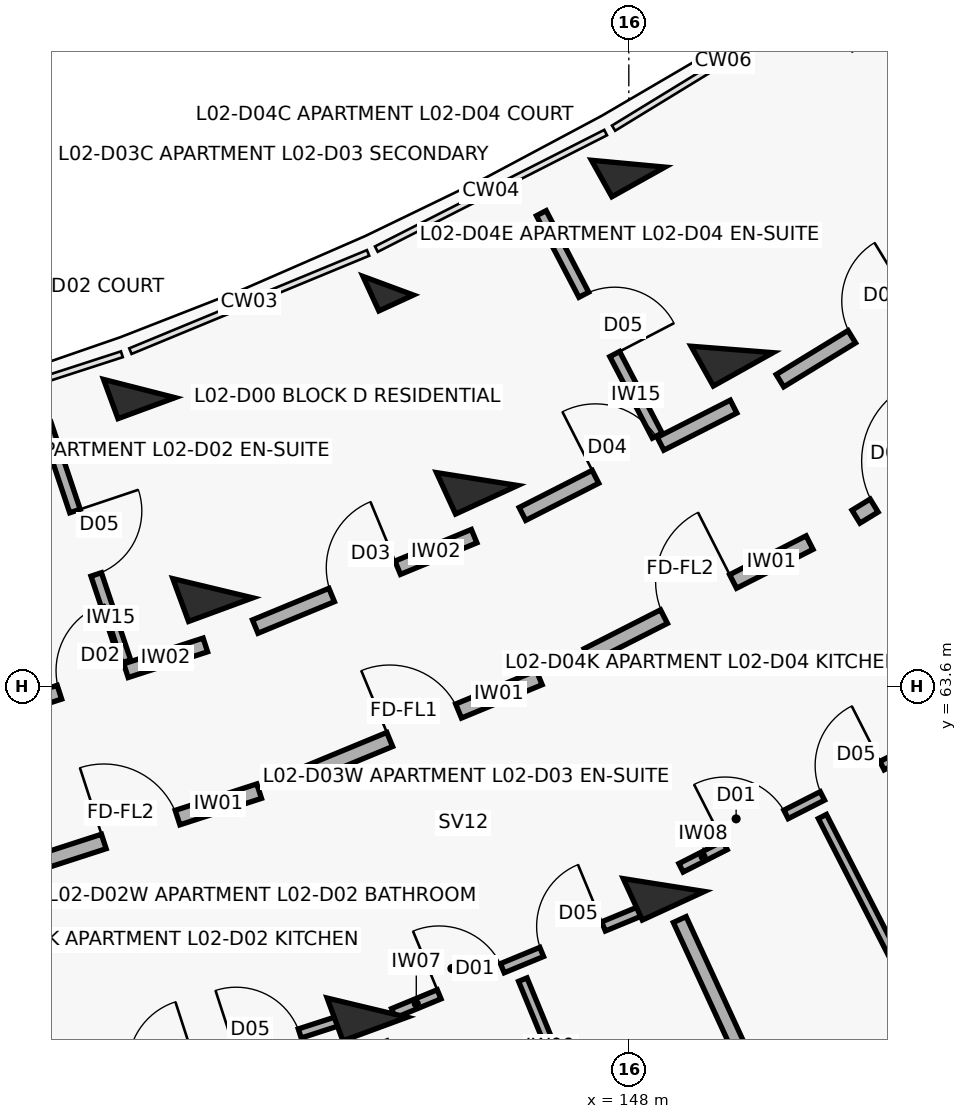
"""IFC4 building model, lengths in metres.
Left out: names, types, materials, properties, quantities, classifications, styles, units other than length and angle.
Written with IfcOpenShell. Run it as: python <this file> out.ifc"""

import sys

from ifc_helpers import new_model, si_unit, direction, frame, frame_2d, origin, origin_2d, place, context, subcontext, project, spatial, rectangle, extrude, element, fill, save


model = new_model("IFC4")
c1 = context("Model", 3, precision=1e-05, world=origin(), true_north=direction((0.0, 1.0)))
c2 = subcontext(c1, "Body", "Model", "MODEL_VIEW")
j1 = project(units=[si_unit("LENGTHUNIT", "METRE"), si_unit("PLANEANGLEUNIT", "RADIAN")], contexts=[c1])
p1 = place(None, origin())
s1 = spatial("IfcSite", under=j1, at=p1, CompositionType="ELEMENT")
p2 = place(p1, origin())
s2 = spatial("IfcBuilding", under=s1, at=p2, CompositionType="ELEMENT")
p3 = place(p2, frame((0.0, 0.0, 8.1)))
s3 = spatial("IfcBuildingStorey", under=s2, at=p3, CompositionType="ELEMENT", Elevation=8.1)
p4 = place(p3, frame((141.56, 67.515, 0.0), z_axis=(0.0, 0.0, 1.0), x_axis=(0.345298198999, -0.93849302276, 0.0)))
e1 = element("IfcColumn", 1, at=p4, inside=s3, PredefinedType="COLUMN", context=c2, shape_type="SweptSolid", body=[
    extrude(rectangle(XDim=0.55, YDim=0.8, at=origin_2d()), origin(), (0.0, 0.0, 1.0), 3.1),
])
for number, where, z_axis, x_axis in (
    (2, (142.527, 64.887, 0.0), (0.0, 0.0, 1.0), (0.345, -0.938, 0.0)),
    (3, (144.557, 59.369, 0.0), (0.0, 0.0, 1.0), (0.345, -0.938, 0.0)),
):
    element("IfcColumn", number, at=place(p3, frame(where, z_axis=z_axis, x_axis=x_axis)), inside=s3, PredefinedType="COLUMN", context=c2, shape_type="SweptSolid", body=[
        extrude(rectangle(XDim=0.6, YDim=0.9, at=origin_2d()), origin(), (0.0, 0.0, 1.0), 3.1),
    ])
p5 = place(p3, frame((144.834, 68.868, 0.0), z_axis=(0.0, 0.0, 1.0), x_axis=(0.417867073801, -0.908508177527, 0.0)))
e4 = element("IfcColumn", 4, at=p5, inside=s3, PredefinedType="COLUMN", context=c2, shape_type="SweptSolid", body=[
    extrude(rectangle(XDim=0.5, YDim=0.5, at=origin_2d()), origin(), (0.0, 0.0, 1.0), 3.1),
])
for number, where, z_axis, x_axis in (
    (5, (146.004, 66.324, 0.0), (0.0, 0.0, 1.0), (0.418, -0.909, 0.0)),
    (6, (148.461, 60.982, 0.0), (0.0, 0.0, 1.0), (0.418, -0.909, 0.0)),
):
    element("IfcColumn", number, at=place(p3, frame(where, z_axis=z_axis, x_axis=x_axis)), inside=s3, PredefinedType="COLUMN", context=c2, shape_type="SweptSolid", body=[
        extrude(rectangle(XDim=0.6, YDim=0.9, at=origin_2d()), origin(), (0.0, 0.0, 1.0), 3.1),
    ])
p6 = place(p3, frame((147.992, 70.474, 0.0), z_axis=(0.0, 0.0, 1.0), x_axis=(0.487859659139, -0.87292207727, 0.0)))
e7 = element("IfcColumn", 7, at=p6, inside=s3, PredefinedType="COLUMN", context=c2, shape_type="SweptSolid", body=[
    extrude(rectangle(XDim=0.55, YDim=0.8, at=origin_2d()), origin(), (0.0, 0.0, 1.0), 3.1),
])
p7 = place(p3, frame((149.358, 68.03, 0.0), z_axis=(0.0, 0.0, 1.0), x_axis=(0.487859659139, -0.87292207727, 0.0)))
e8 = element("IfcColumn", 8, at=p7, inside=s3, PredefinedType="COLUMN", context=c2, shape_type="SweptSolid", body=[
    extrude(rectangle(XDim=0.6, YDim=0.9, at=origin_2d()), origin(), (0.0, 0.0, 1.0), 3.1),
])
p8 = place(p3, frame((140.019, 61.208, 0.0), z_axis=(0.0, 0.0, 1.0), x_axis=(0.951323803878, 0.308193154005, 0.0)))
e9 = element("IfcWall", 9, at=p8, inside=s3, PredefinedType="SOLIDWALL", context=c2, shape_type="SweptSolid", body=[
    extrude(rectangle(XDim=3.277, YDim=0.2, at=frame_2d((1.639, 0.0))), origin(), (0.0, 0.0, 1.0), 2.08),
])
p9 = place(p8, frame((1.128, 0.0, 0.0)))
e10 = element("IfcOpeningElement", 10, at=p9, cuts=e9, PredefinedType="OPENING", context=c2, shape_type="SweptSolid", body=[
    extrude(rectangle(XDim=1.02, YDim=2.15, at=frame_2d((0.51, 1.075))), frame((0.0, 0.11, 0.0), z_axis=(0.0, -1.0, 0.0), x_axis=(1.0, 0.0, 0.0)), (0.0, 0.0, 1.0), 0.22),
])
p10 = place(p3, frame((139.464, 63.181, 0.0), z_axis=(0.0, 0.0, 1.0), x_axis=(0.951336474448, 0.308154040027, 0.0)))
e11 = element("IfcWall", 11, at=p10, inside=s3, PredefinedType="SOLIDWALL", context=c2, shape_type="SweptSolid", body=[
    extrude(rectangle(XDim=3.116, YDim=0.19, at=frame_2d((1.558, 0.0))), origin(), (0.0, 0.0, 1.0), 2.08),
])
p11 = place(p10, frame((1.098, 0.0, 0.0)))
e12 = element("IfcOpeningElement", 12, at=p11, cuts=e11, PredefinedType="OPENING", context=c2, shape_type="SweptSolid", body=[
    extrude(rectangle(XDim=0.92, YDim=2.1, at=frame_2d((0.46, 1.05))), frame((0.0, 0.105, 0.0), z_axis=(0.0, -1.0, 0.0), x_axis=(1.0, 0.0, 0.0)), (0.0, 0.0, 1.0), 0.21),
])
p12 = place(p3, frame((140.328, 67.051, 0.0), z_axis=(0.0, 0.0, 1.0), x_axis=(0.317825321803, -0.948149284038, 0.0)))
e13 = element("IfcWall", 13, at=p12, inside=s3, PredefinedType="PARTITIONING", context=c2, shape_type="SweptSolid", body=[
    extrude(rectangle(XDim=3.3, YDim=0.145, at=frame_2d((1.65, 0.0))), origin(), (0.0, 0.0, 1.0), 2.08),
])
p13 = place(p12, frame((1.21, 0.0, 0.0)))
e14 = element("IfcOpeningElement", 14, at=p13, cuts=e13, PredefinedType="OPENING", context=c2, shape_type="SweptSolid", body=[
    extrude(rectangle(XDim=0.88, YDim=2.1, at=frame_2d((0.44, 1.05))), frame((0.0, 0.083, 0.0), z_axis=(0.0, -1.0, 0.0), x_axis=(1.0, 0.0, 0.0)), (0.0, 0.0, 1.0), 0.165),
])
p14 = place(p3, frame((140.837, 58.112, 0.0), z_axis=(0.0, 0.0, 1.0), x_axis=(0.951327366371, 0.308182157164, 0.0)))
e15 = element("IfcWall", 15, at=p14, inside=s3, PredefinedType="PARTITIONING", context=c2, shape_type="SweptSolid", body=[
    extrude(rectangle(XDim=3.628, YDim=0.125, at=frame_2d((1.814, 0.0))), origin(), (0.0, 0.0, 1.0), 2.08),
])
p15 = place(p14, frame((0.65, 0.0, 0.0)))
e16 = element("IfcOpeningElement", 16, at=p15, cuts=e15, PredefinedType="OPENING", context=c2, shape_type="SweptSolid", body=[
    extrude(rectangle(XDim=0.9, YDim=2.1, at=frame_2d((0.45, 1.05))), frame((0.0, 0.073, 0.0), z_axis=(0.0, -1.0, 0.0), x_axis=(1.0, 0.0, 0.0)), (0.0, 0.0, 1.0), 0.145),
])
p16 = place(p14, frame((2.098, 0.0, 0.0)))
e17 = element("IfcOpeningElement", 17, at=p16, cuts=e15, PredefinedType="OPENING", context=c2, shape_type="SweptSolid", body=[
    extrude(rectangle(XDim=0.88, YDim=2.1, at=frame_2d((0.44, 1.05))), frame((0.0, 0.073, 0.0), z_axis=(0.0, -1.0, 0.0), x_axis=(1.0, 0.0, 0.0)), (0.0, 0.0, 1.0), 0.145),
])
p17 = place(p3, frame((143.793, 62.459, 0.0), z_axis=(0.0, 0.0, 1.0), x_axis=(0.924214561665, 0.381873596896, 0.0)))
e18 = element("IfcWall", 18, at=p17, inside=s3, PredefinedType="SOLIDWALL", context=c2, shape_type="SweptSolid", body=[
    extrude(rectangle(XDim=3.277, YDim=0.2, at=frame_2d((1.639, 0.0))), origin(), (0.0, 0.0, 1.0), 2.08),
])
p18 = place(p17, frame((1.148, 0.0, 0.0)))
e19 = element("IfcOpeningElement", 19, at=p18, cuts=e18, PredefinedType="OPENING", context=c2, shape_type="SweptSolid", body=[
    extrude(rectangle(XDim=0.98, YDim=2.15, at=frame_2d((0.49, 1.075))), frame((0.0, 0.11, 0.0), z_axis=(0.0, -1.0, 0.0), x_axis=(1.0, 0.0, 0.0)), (0.0, 0.0, 1.0), 0.22),
])
p19 = place(p3, frame((143.085, 64.383, 0.0), z_axis=(0.0, 0.0, 1.0), x_axis=(0.924213340202, 0.381876553081, 0.0)))
e20 = element("IfcWall", 20, at=p19, inside=s3, PredefinedType="SOLIDWALL", context=c2, shape_type="SweptSolid", body=[
    extrude(rectangle(XDim=3.116, YDim=0.19, at=frame_2d((1.558, 0.0))), origin(), (0.0, 0.0, 1.0), 2.08),
])
p20 = place(p19, frame((1.088, 0.0, 0.0)))
e21 = element("IfcOpeningElement", 21, at=p20, cuts=e20, PredefinedType="OPENING", context=c2, shape_type="SweptSolid", body=[
    extrude(rectangle(XDim=0.94, YDim=2.1, at=frame_2d((0.47, 1.05))), frame((0.0, 0.105, 0.0), z_axis=(0.0, -1.0, 0.0), x_axis=(1.0, 0.0, 0.0)), (0.0, 0.0, 1.0), 0.21),
])
p21 = place(p3, frame((144.903, 59.296, 0.0), z_axis=(0.0, 0.0, 1.0), x_axis=(0.924207914011, 0.381889685223, 0.0)))
e22 = element("IfcWall", 22, at=p21, inside=s3, PredefinedType="PARTITIONING", context=c2, shape_type="SweptSolid", body=[
    extrude(rectangle(XDim=3.64, YDim=0.13, at=frame_2d((1.82, 0.0))), origin(), (0.0, 0.0, 1.0), 2.08),
])
p22 = place(p21, frame((0.65, 0.0, 0.0)))
e23 = element("IfcOpeningElement", 23, at=p22, cuts=e22, PredefinedType="OPENING", context=c2, shape_type="SweptSolid", body=[
    extrude(rectangle(XDim=0.9, YDim=2.1, at=frame_2d((0.45, 1.05))), frame((0.0, 0.075, 0.0), z_axis=(0.0, -1.0, 0.0), x_axis=(1.0, 0.0, 0.0)), (0.0, 0.0, 1.0), 0.15),
])
p23 = place(p21, frame((2.11, 0.0, 0.0)))
e24 = element("IfcOpeningElement", 24, at=p23, cuts=e22, PredefinedType="OPENING", context=c2, shape_type="SweptSolid", body=[
    extrude(rectangle(XDim=0.88, YDim=2.1, at=frame_2d((0.44, 1.05))), frame((0.0, 0.075, 0.0), z_axis=(0.0, -1.0, 0.0), x_axis=(1.0, 0.0, 0.0)), (0.0, 0.0, 1.0), 0.15),
])
p24 = place(p3, frame((146.605, 59.738, 0.0), z_axis=(0.0, 0.0, 1.0), x_axis=(0.380553327256, -0.924758976769, 0.0)))
e25 = element("IfcWall", 25, at=p24, inside=s3, PredefinedType="PARTITIONING", context=c2, shape_type="SweptSolid", body=[
    extrude(rectangle(XDim=4.75, YDim=0.12, at=frame_2d((2.375, 0.0))), origin(), (0.0, 0.0, 1.0), 2.08),
])
p25 = place(p24, frame((1.915, 0.0, 0.0)))
e26 = element("IfcOpeningElement", 26, at=p25, cuts=e25, PredefinedType="OPENING", context=c2, shape_type="SweptSolid", body=[
    extrude(rectangle(XDim=0.92, YDim=2.1, at=frame_2d((0.46, 1.05))), frame((0.0, 0.07, 0.0), z_axis=(0.0, -1.0, 0.0), x_axis=(1.0, 0.0, 0.0)), (0.0, 0.0, 1.0), 0.14),
])
p26 = place(p3, frame((147.457, 64.003, 0.0), z_axis=(0.0, 0.0, 1.0), x_axis=(0.891412167565, 0.45319349898, 0.0)))
e27 = element("IfcWall", 27, at=p26, inside=s3, PredefinedType="SOLIDWALL", context=c2, shape_type="SweptSolid", body=[
    extrude(rectangle(XDim=3.277, YDim=0.2, at=frame_2d((1.639, 0.0))), origin(), (0.0, 0.0, 1.0), 2.08),
])
p27 = place(p26, frame((1.128, 0.0, 0.0)))
e28 = element("IfcOpeningElement", 28, at=p27, cuts=e27, PredefinedType="OPENING", context=c2, shape_type="SweptSolid", body=[
    extrude(rectangle(XDim=1.02, YDim=2.15, at=frame_2d((0.51, 1.075))), frame((0.0, 0.11, 0.0), z_axis=(0.0, -1.0, 0.0), x_axis=(1.0, 0.0, 0.0)), (0.0, 0.0, 1.0), 0.22),
])
p28 = place(p3, frame((146.6, 65.865, 0.0), z_axis=(0.0, 0.0, 1.0), x_axis=(0.891414101388, 0.453189695212, 0.0)))
e29 = element("IfcWall", 29, at=p28, inside=s3, PredefinedType="SOLIDWALL", context=c2, shape_type="SweptSolid", body=[
    extrude(rectangle(XDim=3.116, YDim=0.19, at=frame_2d((1.558, 0.0))), origin(), (0.0, 0.0, 1.0), 2.08),
])
p29 = place(p28, frame((1.078, 0.0, 0.0)))
e30 = element("IfcOpeningElement", 30, at=p29, cuts=e29, PredefinedType="OPENING", context=c2, shape_type="SweptSolid", body=[
    extrude(rectangle(XDim=0.96, YDim=2.1, at=frame_2d((0.48, 1.05))), frame((0.0, 0.105, 0.0), z_axis=(0.0, -1.0, 0.0), x_axis=(1.0, 0.0, 0.0)), (0.0, 0.0, 1.0), 0.21),
])
p30 = place(p3, frame((146.849, 69.822, 0.0), z_axis=(0.0, 0.0, 1.0), x_axis=(0.462242343884, -0.886753638572, 0.0)))
e31 = element("IfcWall", 31, at=p30, inside=s3, PredefinedType="PARTITIONING", context=c2, shape_type="SweptSolid", body=[
    extrude(rectangle(XDim=3.3, YDim=0.145, at=frame_2d((1.65, 0.0))), origin(), (0.0, 0.0, 1.0), 2.08),
])
p31 = place(p30, frame((1.21, 0.0, 0.0)))
e32 = element("IfcOpeningElement", 32, at=p31, cuts=e31, PredefinedType="OPENING", context=c2, shape_type="SweptSolid", body=[
    extrude(rectangle(XDim=0.88, YDim=2.1, at=frame_2d((0.44, 1.05))), frame((0.0, 0.083, 0.0), z_axis=(0.0, -1.0, 0.0), x_axis=(1.0, 0.0, 0.0)), (0.0, 0.0, 1.0), 0.165),
])
p32 = place(p3, frame((148.687, 61.209, 0.0), z_axis=(0.0, 0.0, 1.0), x_axis=(0.891396224028, 0.453224857866, 0.0)))
e33 = element("IfcWall", 33, at=p32, inside=s3, PredefinedType="PARTITIONING", context=c2, shape_type="SweptSolid", body=[
    extrude(rectangle(XDim=3.617, YDim=0.125, at=frame_2d((1.808, 0.0))), origin(), (0.0, 0.0, 1.0), 2.08),
])
p33 = place(p32, frame((0.65, 0.0, 0.0)))
e34 = element("IfcOpeningElement", 34, at=p33, cuts=e33, PredefinedType="OPENING", context=c2, shape_type="SweptSolid", body=[
    extrude(rectangle(XDim=0.9, YDim=2.1, at=frame_2d((0.45, 1.05))), frame((0.0, 0.073, 0.0), z_axis=(0.0, -1.0, 0.0), x_axis=(1.0, 0.0, 0.0)), (0.0, 0.0, 1.0), 0.145),
])
p34 = place(p32, frame((2.086, 0.0, 0.0)))
e35 = element("IfcOpeningElement", 35, at=p34, cuts=e33, PredefinedType="OPENING", context=c2, shape_type="SweptSolid", body=[
    extrude(rectangle(XDim=0.88, YDim=2.1, at=frame_2d((0.44, 1.05))), frame((0.0, 0.073, 0.0), z_axis=(0.0, -1.0, 0.0), x_axis=(1.0, 0.0, 0.0)), (0.0, 0.0, 1.0), 0.145),
])
p35 = place(p3, frame((150.547, 61.884, 0.0), z_axis=(0.0, 0.0, 1.0), x_axis=(0.455778725258, -0.89009311513, 0.0)))
e36 = element("IfcWall", 36, at=p35, inside=s3, PredefinedType="PARTITIONING", context=c2, shape_type="SweptSolid", body=[
    extrude(rectangle(XDim=5.05, YDim=0.12, at=frame_2d((2.525, 0.0))), origin(), (0.0, 0.0, 1.0), 2.08),
])
p36 = place(p35, frame((2.055, 0.0, 0.0)))
e37 = element("IfcOpeningElement", 37, at=p36, cuts=e36, PredefinedType="OPENING", context=c2, shape_type="SweptSolid", body=[
    extrude(rectangle(XDim=0.94, YDim=2.1, at=frame_2d((0.47, 1.05))), frame((0.0, 0.07, 0.0), z_axis=(0.0, -1.0, 0.0), x_axis=(1.0, 0.0, 0.0)), (0.0, 0.0, 1.0), 0.14),
])
p37 = place(p3, frame((148.67, 60.528, 0.0), z_axis=(0.0, 0.0, 1.0), x_axis=(0.417837051164, -0.908521985796, 0.0)))
e38 = element("IfcWall", 38, at=p37, inside=s3, PredefinedType="SOLIDWALL", context=c2, shape_type="SweptSolid", body=[
    extrude(rectangle(XDim=4.35, YDim=0.185, at=frame_2d((2.175, 0.0))), origin(), (0.0, 0.0, 1.0), 2.08),
])
p38 = place(p3, frame((150.989, 65.829, 0.0), z_axis=(0.0, 0.0, 1.0), x_axis=(0.853090237845, 0.521763400492, 0.0)))
e39 = element("IfcWall", 39, at=p38, inside=s3, PredefinedType="SOLIDWALL", context=c2, shape_type="SweptSolid", body=[
    extrude(rectangle(XDim=3.277, YDim=0.2, at=frame_2d((1.638, 0.0))), origin(), (0.0, 0.0, 1.0), 2.08),
])
p39 = place(p38, frame((0.28, 0.0, 0.0)))
e40 = element("IfcOpeningElement", 40, at=p39, cuts=e39, PredefinedType="OPENING", context=c2, shape_type="SweptSolid", body=[
    extrude(rectangle(XDim=1.12, YDim=2.15, at=frame_2d((0.56, 1.075))), frame((0.0, 0.11, 0.0), z_axis=(0.0, -1.0, 0.0), x_axis=(1.0, 0.0, 0.0)), (0.0, 0.0, 1.0), 0.22),
])
p40 = place(p38, frame((2.107, 0.0, 0.0)))
e41 = element("IfcOpeningElement", 41, at=p40, cuts=e39, PredefinedType="OPENING", context=c2, shape_type="SweptSolid", body=[
    extrude(rectangle(XDim=0.95, YDim=2.1, at=frame_2d((0.475, 1.05))), frame((0.0, 0.11, 0.0), z_axis=(0.0, -1.0, 0.0), x_axis=(1.0, 0.0, 0.0)), (0.0, 0.0, 1.0), 0.22),
])
p41 = place(p3, frame((149.989, 67.619, 0.0), z_axis=(0.0, 0.0, 1.0), x_axis=(0.853121049608, 0.5217130195, 0.0)))
e42 = element("IfcWall", 42, at=p41, inside=s3, PredefinedType="SOLIDWALL", context=c2, shape_type="SweptSolid", body=[
    extrude(rectangle(XDim=3.116, YDim=0.19, at=frame_2d((1.558, 0.0))), origin(), (0.0, 0.0, 1.0), 2.08),
])
p42 = place(p41, frame((1.108, 0.0, 0.0)))
e43 = element("IfcOpeningElement", 43, at=p42, cuts=e42, PredefinedType="OPENING", context=c2, shape_type="SweptSolid", body=[
    extrude(rectangle(XDim=0.9, YDim=2.1, at=frame_2d((0.45, 1.05))), frame((0.0, 0.105, 0.0), z_axis=(0.0, -1.0, 0.0), x_axis=(1.0, 0.0, 0.0)), (0.0, 0.0, 1.0), 0.21),
])
p43 = place(p9, origin())
e44 = element("IfcDoor", 44, at=p43, inside=s3, OperationType="SINGLE_SWING_LEFT", PredefinedType="DOOR", context=c2, shape_type="SweptSolid", body=[
    extrude(rectangle(XDim=1.02, YDim=2.15, at=frame_2d((0.51, 1.075))), frame((0.0, 0.025, 0.0), z_axis=(0.0, -1.0, 0.0), x_axis=(1.0, 0.0, 0.0)), (0.0, 0.0, 1.0), 0.05),
])
fill(e10, e44)
p44 = place(p11, origin())
e45 = element("IfcDoor", 45, at=p44, inside=s3, OperationType="SINGLE_SWING_RIGHT", PredefinedType="DOOR", context=c2, shape_type="SweptSolid", body=[
    extrude(rectangle(XDim=0.92, YDim=2.1, at=frame_2d((0.46, 1.05))), frame((0.0, 0.025, 0.0), z_axis=(0.0, -1.0, 0.0), x_axis=(1.0, 0.0, 0.0)), (0.0, 0.0, 1.0), 0.05),
])
fill(e12, e45)
p45 = place(p13, origin())
e46 = element("IfcDoor", 46, at=p45, inside=s3, OperationType="SINGLE_SWING_LEFT", PredefinedType="DOOR", context=c2, shape_type="SweptSolid", body=[
    extrude(rectangle(XDim=0.88, YDim=2.1, at=frame_2d((0.44, 1.05))), frame((0.0, 0.025, 0.0), z_axis=(0.0, -1.0, 0.0), x_axis=(1.0, 0.0, 0.0)), (0.0, 0.0, 1.0), 0.05),
])
fill(e14, e46)
p46 = place(p16, origin())
e47 = element("IfcDoor", 47, at=p46, inside=s3, OperationType="SINGLE_SWING_LEFT", PredefinedType="DOOR", context=c2, shape_type="SweptSolid", body=[
    extrude(rectangle(XDim=0.88, YDim=2.1, at=frame_2d((0.44, 1.05))), frame((0.0, 0.025, 0.0), z_axis=(0.0, -1.0, 0.0), x_axis=(1.0, 0.0, 0.0)), (0.0, 0.0, 1.0), 0.05),
])
fill(e17, e47)
p47 = place(p18, origin())
e48 = element("IfcDoor", 48, at=p47, inside=s3, OperationType="SINGLE_SWING_LEFT", PredefinedType="DOOR", context=c2, shape_type="SweptSolid", body=[
    extrude(rectangle(XDim=0.98, YDim=2.15, at=frame_2d((0.49, 1.075))), frame((0.0, 0.025, 0.0), z_axis=(0.0, -1.0, 0.0), x_axis=(1.0, 0.0, 0.0)), (0.0, 0.0, 1.0), 0.05),
])
fill(e19, e48)
p48 = place(p20, origin())
e49 = element("IfcDoor", 49, at=p48, inside=s3, OperationType="SINGLE_SWING_RIGHT", PredefinedType="DOOR", context=c2, shape_type="SweptSolid", body=[
    extrude(rectangle(XDim=0.94, YDim=2.1, at=frame_2d((0.47, 1.05))), frame((0.0, 0.025, 0.0), z_axis=(0.0, -1.0, 0.0), x_axis=(1.0, 0.0, 0.0)), (0.0, 0.0, 1.0), 0.05),
])
fill(e21, e49)
p49 = place(p22, origin())
e50 = element("IfcDoor", 50, at=p49, inside=s3, OperationType="SINGLE_SWING_LEFT", PredefinedType="DOOR", context=c2, shape_type="SweptSolid", body=[
    extrude(rectangle(XDim=0.9, YDim=2.1, at=frame_2d((0.45, 1.05))), frame((0.0, 0.025, 0.0), z_axis=(0.0, -1.0, 0.0), x_axis=(1.0, 0.0, 0.0)), (0.0, 0.0, 1.0), 0.05),
])
fill(e23, e50)
p50 = place(p23, origin())
e51 = element("IfcDoor", 51, at=p50, inside=s3, OperationType="SINGLE_SWING_RIGHT", PredefinedType="DOOR", context=c2, shape_type="SweptSolid", body=[
    extrude(rectangle(XDim=0.88, YDim=2.1, at=frame_2d((0.44, 1.05))), frame((0.0, 0.025, 0.0), z_axis=(0.0, -1.0, 0.0), x_axis=(1.0, 0.0, 0.0)), (0.0, 0.0, 1.0), 0.05),
])
fill(e24, e51)
p51 = place(p27, origin())
e52 = element("IfcDoor", 52, at=p51, inside=s3, OperationType="SINGLE_SWING_RIGHT", PredefinedType="DOOR", context=c2, shape_type="SweptSolid", body=[
    extrude(rectangle(XDim=1.02, YDim=2.15, at=frame_2d((0.51, 1.075))), frame((0.0, 0.025, 0.0), z_axis=(0.0, -1.0, 0.0), x_axis=(1.0, 0.0, 0.0)), (0.0, 0.0, 1.0), 0.05),
])
fill(e28, e52)
p52 = place(p29, origin())
e53 = element("IfcDoor", 53, at=p52, inside=s3, OperationType="SINGLE_SWING_LEFT", PredefinedType="DOOR", context=c2, shape_type="SweptSolid", body=[
    extrude(rectangle(XDim=0.96, YDim=2.1, at=frame_2d((0.48, 1.05))), frame((0.0, 0.025, 0.0), z_axis=(0.0, -1.0, 0.0), x_axis=(1.0, 0.0, 0.0)), (0.0, 0.0, 1.0), 0.05),
])
fill(e30, e53)
p53 = place(p31, origin())
e54 = element("IfcDoor", 54, at=p53, inside=s3, OperationType="SINGLE_SWING_RIGHT", PredefinedType="DOOR", context=c2, shape_type="SweptSolid", body=[
    extrude(rectangle(XDim=0.88, YDim=2.1, at=frame_2d((0.44, 1.05))), frame((0.0, 0.025, 0.0), z_axis=(0.0, -1.0, 0.0), x_axis=(1.0, 0.0, 0.0)), (0.0, 0.0, 1.0), 0.05),
])
fill(e32, e54)
p54 = place(p33, origin())
e55 = element("IfcDoor", 55, at=p54, inside=s3, OperationType="SINGLE_SWING_LEFT", PredefinedType="DOOR", context=c2, shape_type="SweptSolid", body=[
    extrude(rectangle(XDim=0.9, YDim=2.1, at=frame_2d((0.45, 1.05))), frame((0.0, 0.025, 0.0), z_axis=(0.0, -1.0, 0.0), x_axis=(1.0, 0.0, 0.0)), (0.0, 0.0, 1.0), 0.05),
])
fill(e34, e55)
p55 = place(p34, origin())
e56 = element("IfcDoor", 56, at=p55, inside=s3, OperationType="SINGLE_SWING_RIGHT", PredefinedType="DOOR", context=c2, shape_type="SweptSolid", body=[
    extrude(rectangle(XDim=0.88, YDim=2.1, at=frame_2d((0.44, 1.05))), frame((0.0, 0.025, 0.0), z_axis=(0.0, -1.0, 0.0), x_axis=(1.0, 0.0, 0.0)), (0.0, 0.0, 1.0), 0.05),
])
fill(e35, e56)
p56 = place(p39, origin())
e57 = element("IfcDoor", 57, at=p56, inside=s3, OperationType="SINGLE_SWING_RIGHT", PredefinedType="DOOR", context=c2, shape_type="SweptSolid", body=[
    extrude(rectangle(XDim=1.12, YDim=2.15, at=frame_2d((0.56, 1.075))), frame((0.0, 0.025, 0.0), z_axis=(0.0, -1.0, 0.0), x_axis=(1.0, 0.0, 0.0)), (0.0, 0.0, 1.0), 0.05),
])
fill(e40, e57)
p57 = place(p42, origin())
e58 = element("IfcDoor", 58, at=p57, inside=s3, OperationType="SINGLE_SWING_RIGHT", PredefinedType="DOOR", context=c2, shape_type="SweptSolid", body=[
    extrude(rectangle(XDim=0.9, YDim=2.1, at=frame_2d((0.45, 1.05))), frame((0.0, 0.025, 0.0), z_axis=(0.0, -1.0, 0.0), x_axis=(1.0, 0.0, 0.0)), (0.0, 0.0, 1.0), 0.05),
])
fill(e43, e58)
save(model, sys.argv[1])
